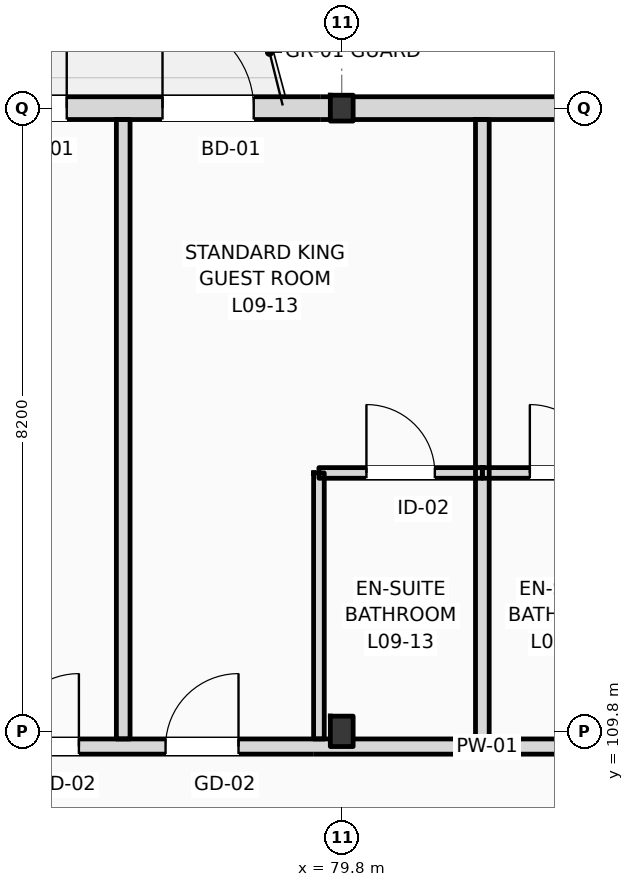
"""IFC4 building model, lengths in metres.
Left out: names, types, materials, properties, quantities, classifications, styles, units other than length and angle.
Written with IfcOpenShell. Run it as: python <this file> out.ifc"""

import sys

from ifc_helpers import new_model, si_unit, direction, frame, frame_2d, origin, origin_2d, place, context, subcontext, project, spatial, rectangle, i_section, extrude, element, fill, save


model = new_model("IFC4")
c1 = context("Model", 3, precision=1e-05, world=origin(), true_north=direction((0.0, 1.0)))
c2 = subcontext(c1, "Body", "Model", "MODEL_VIEW")
j1 = project(units=[si_unit("LENGTHUNIT", "METRE"), si_unit("PLANEANGLEUNIT", "RADIAN")], contexts=[c1])
p1 = place(None, origin())
s1 = spatial("IfcSite", under=j1, at=p1, CompositionType="ELEMENT")
p2 = place(p1, origin())
s2 = spatial("IfcBuilding", under=s1, at=p2, CompositionType="ELEMENT")
p3 = place(p2, frame((0.0, 0.0, 39.0)))
s3 = spatial("IfcBuildingStorey", under=s2, at=p3, CompositionType="ELEMENT", Elevation=39.0)
p4 = place(p3, frame((79.8, 109.8, 0.0), z_axis=(0.0, 0.0, 1.0), x_axis=(1.0, 0.0, 0.0)))
e1 = element("IfcColumn", 1, at=p4, inside=s3, PredefinedType="COLUMN", context=c2, shape_type="SweptSolid", body=[
    extrude(i_section(OverallWidth=0.3, OverallDepth=0.4, WebThickness=0.013, FlangeThickness=0.024, FilletRadius=0.027, at=origin_2d()), origin(), (0.0, 0.0, 1.0), 3.6),
])
p5 = place(p3, frame((79.8, 118.0, 0.0), z_axis=(0.0, 0.0, 1.0), x_axis=(1.0, 0.0, 0.0)))
e2 = element("IfcColumn", 2, at=p5, inside=s3, PredefinedType="COLUMN", context=c2, shape_type="SweptSolid", body=[
    extrude(i_section(OverallWidth=0.3, OverallDepth=0.34, WebThickness=0.012, FlangeThickness=0.021, FilletRadius=0.027, at=origin_2d()), origin(), (0.0, 0.0, 1.0), 3.6),
])
p6 = place(p3, frame((22.5, 118.0, 0.0), z_axis=(0.0, 0.0, 1.0), x_axis=(1.0, 0.0, 0.0)))
e3 = element("IfcWall", 3, at=p6, inside=s3, PredefinedType="STANDARD", context=c2, shape_type="SweptSolid", body=[
    extrude(rectangle(XDim=72.9, YDim=0.3, at=frame_2d((36.45, 0.0))), origin(), (0.0, 0.0, 1.0), 2.92),
])
p7 = place(p6, frame((3.6, 0.0, 0.9)))
e4 = element("IfcOpeningElement", 4, at=p7, cuts=e3, PredefinedType="OPENING", context=c2, shape_type="SweptSolid", body=[
    extrude(rectangle(XDim=1.1, YDim=1.6, at=frame_2d((0.55, 0.8))), frame((0.0, 0.16, 0.0), z_axis=(0.0, -1.0, 0.0), x_axis=(1.0, 0.0, 0.0)), (0.0, 0.0, 1.0), 0.32),
])
p8 = place(p6, frame((6.688, 0.0, 0.0)))
e5 = element("IfcOpeningElement", 5, at=p8, cuts=e3, PredefinedType="OPENING", context=c2, shape_type="SweptSolid", body=[
    extrude(rectangle(XDim=1.2, YDim=2.25, at=frame_2d((0.6, 1.125))), frame((0.0, 0.16, 0.0), z_axis=(0.0, -1.0, 0.0), x_axis=(1.0, 0.0, 0.0)), (0.0, 0.0, 1.0), 0.32),
])
p9 = place(p6, frame((11.388, 0.0, 0.9)))
e6 = element("IfcOpeningElement", 6, at=p9, cuts=e3, PredefinedType="OPENING", context=c2, shape_type="SweptSolid", body=[
    extrude(rectangle(XDim=1.6, YDim=1.75, at=frame_2d((0.8, 0.875))), frame((0.0, 0.16, 0.0), z_axis=(0.0, -1.0, 0.0), x_axis=(1.0, 0.0, 0.0)), (0.0, 0.0, 1.0), 0.32),
])
p10 = place(p6, frame((15.413, 0.0, 0.9)))
e7 = element("IfcOpeningElement", 7, at=p10, cuts=e3, PredefinedType="OPENING", context=c2, shape_type="SweptSolid", body=[
    extrude(rectangle(XDim=1.75, YDim=1.84, at=frame_2d((0.875, 0.92))), frame((0.0, 0.16, 0.0), z_axis=(0.0, -1.0, 0.0), x_axis=(1.0, 0.0, 0.0)), (0.0, 0.0, 1.0), 0.32),
])
p11 = place(p6, frame((21.245, 0.0, 0.0)))
e8 = element("IfcOpeningElement", 8, at=p11, cuts=e3, PredefinedType="OPENING", context=c2, shape_type="SweptSolid", body=[
    extrude(rectangle(XDim=1.2, YDim=2.25, at=frame_2d((0.6, 1.125))), frame((0.0, 0.16, 0.0), z_axis=(0.0, -1.0, 0.0), x_axis=(1.0, 0.0, 0.0)), (0.0, 0.0, 1.0), 0.32),
])
p12 = place(p6, frame((23.705, 0.0, 0.0)))
e9 = element("IfcOpeningElement", 9, at=p12, cuts=e3, PredefinedType="OPENING", context=c2, shape_type="SweptSolid", body=[
    extrude(rectangle(XDim=1.2, YDim=2.25, at=frame_2d((0.6, 1.125))), frame((0.0, 0.16, 0.0), z_axis=(0.0, -1.0, 0.0), x_axis=(1.0, 0.0, 0.0)), (0.0, 0.0, 1.0), 0.32),
])
p13 = place(p6, frame((28.488, 0.0, 0.9)))
e10 = element("IfcOpeningElement", 10, at=p13, cuts=e3, PredefinedType="OPENING", context=c2, shape_type="SweptSolid", body=[
    extrude(rectangle(XDim=2.6, YDim=1.84, at=frame_2d((1.3, 0.92))), frame((0.0, 0.16, 0.0), z_axis=(0.0, -1.0, 0.0), x_axis=(1.0, 0.0, 0.0)), (0.0, 0.0, 1.0), 0.32),
])
p14 = place(p6, frame((34.76, 0.0, 0.9)))
e11 = element("IfcOpeningElement", 11, at=p14, cuts=e3, PredefinedType="OPENING", context=c2, shape_type="SweptSolid", body=[
    extrude(rectangle(XDim=1.1, YDim=1.84, at=frame_2d((0.55, 0.92))), frame((0.0, 0.16, 0.0), z_axis=(0.0, -1.0, 0.0), x_axis=(1.0, 0.0, 0.0)), (0.0, 0.0, 1.0), 0.32),
])
p15 = place(p6, frame((38.143, 0.0, 0.0)))
e12 = element("IfcOpeningElement", 12, at=p15, cuts=e3, PredefinedType="OPENING", context=c2, shape_type="SweptSolid", body=[
    extrude(rectangle(XDim=1.2, YDim=2.25, at=frame_2d((0.6, 1.125))), frame((0.0, 0.16, 0.0), z_axis=(0.0, -1.0, 0.0), x_axis=(1.0, 0.0, 0.0)), (0.0, 0.0, 1.0), 0.32),
])
p16 = place(p6, frame((42.687, 0.0, 0.9)))
e13 = element("IfcOpeningElement", 13, at=p16, cuts=e3, PredefinedType="OPENING", context=c2, shape_type="SweptSolid", body=[
    extrude(rectangle(XDim=1.2, YDim=1.8, at=frame_2d((0.6, 0.9))), frame((0.0, 0.16, 0.0), z_axis=(0.0, -1.0, 0.0), x_axis=(1.0, 0.0, 0.0)), (0.0, 0.0, 1.0), 0.32),
])
p17 = place(p6, frame((47.112, 0.0, 0.9)))
e14 = element("IfcOpeningElement", 14, at=p17, cuts=e3, PredefinedType="OPENING", context=c2, shape_type="SweptSolid", body=[
    extrude(rectangle(XDim=1.35, YDim=1.84, at=frame_2d((0.675, 0.92))), frame((0.0, 0.16, 0.0), z_axis=(0.0, -1.0, 0.0), x_axis=(1.0, 0.0, 0.0)), (0.0, 0.0, 1.0), 0.32),
])
p18 = place(p6, frame((52.482, 0.0, 0.0)))
e15 = element("IfcOpeningElement", 15, at=p18, cuts=e3, PredefinedType="OPENING", context=c2, shape_type="SweptSolid", body=[
    extrude(rectangle(XDim=1.2, YDim=2.25, at=frame_2d((0.6, 1.125))), frame((0.0, 0.16, 0.0), z_axis=(0.0, -1.0, 0.0), x_axis=(1.0, 0.0, 0.0)), (0.0, 0.0, 1.0), 0.32),
])
p19 = place(p6, frame((54.942, 0.0, 0.0)))
e16 = element("IfcOpeningElement", 16, at=p19, cuts=e3, PredefinedType="OPENING", context=c2, shape_type="SweptSolid", body=[
    extrude(rectangle(XDim=1.2, YDim=2.25, at=frame_2d((0.6, 1.125))), frame((0.0, 0.16, 0.0), z_axis=(0.0, -1.0, 0.0), x_axis=(1.0, 0.0, 0.0)), (0.0, 0.0, 1.0), 0.32),
])
p20 = place(p6, frame((60.387, 0.0, 0.9)))
e17 = element("IfcOpeningElement", 17, at=p20, cuts=e3, PredefinedType="OPENING", context=c2, shape_type="SweptSolid", body=[
    extrude(rectangle(XDim=1.8, YDim=1.84, at=frame_2d((0.9, 0.92))), frame((0.0, 0.16, 0.0), z_axis=(0.0, -1.0, 0.0), x_axis=(1.0, 0.0, 0.0)), (0.0, 0.0, 1.0), 0.32),
])
p21 = place(p6, frame((66.013, 0.0, 0.9)))
e18 = element("IfcOpeningElement", 18, at=p21, cuts=e3, PredefinedType="OPENING", context=c2, shape_type="SweptSolid", body=[
    extrude(rectangle(XDim=1.35, YDim=1.84, at=frame_2d((0.675, 0.92))), frame((0.0, 0.16, 0.0), z_axis=(0.0, -1.0, 0.0), x_axis=(1.0, 0.0, 0.0)), (0.0, 0.0, 1.0), 0.32),
])
p22 = place(p6, frame((69.275, 0.0, 0.9)))
e19 = element("IfcOpeningElement", 19, at=p22, cuts=e3, PredefinedType="OPENING", context=c2, shape_type="SweptSolid", body=[
    extrude(rectangle(XDim=2.1, YDim=1.84, at=frame_2d((1.05, 0.92))), frame((0.0, 0.16, 0.0), z_axis=(0.0, -1.0, 0.0), x_axis=(1.0, 0.0, 0.0)), (0.0, 0.0, 1.0), 0.32),
])
p23 = place(p3, frame((10.65, 109.6, 0.0), z_axis=(0.0, 0.0, 1.0), x_axis=(1.0, 0.0, 0.0)))
e20 = element("IfcWall", 20, at=p23, inside=s3, PredefinedType="PARTITIONING", context=c2, shape_type="SweptSolid", body=[
    extrude(rectangle(XDim=84.61, YDim=0.2, at=frame_2d((42.305, 0.0))), origin(), (0.0, 0.0, 1.0), 2.82),
])
p24 = place(p23, frame((15.49, 0.0, 0.0)))
e21 = element("IfcOpeningElement", 21, at=p24, cuts=e20, PredefinedType="OPENING", context=c2, shape_type="SweptSolid", body=[
    extrude(rectangle(XDim=1.02, YDim=2.2, at=frame_2d((0.51, 1.1))), frame((0.0, 0.11, 0.0), z_axis=(0.0, -1.0, 0.0), x_axis=(1.0, 0.0, 0.0)), (0.0, 0.0, 1.0), 0.22),
])
p25 = place(p23, frame((19.703, 0.0, 0.0)))
e22 = element("IfcOpeningElement", 22, at=p25, cuts=e20, PredefinedType="OPENING", context=c2, shape_type="SweptSolid", body=[
    extrude(rectangle(XDim=1.02, YDim=2.2, at=frame_2d((0.51, 1.1))), frame((0.0, 0.11, 0.0), z_axis=(0.0, -1.0, 0.0), x_axis=(1.0, 0.0, 0.0)), (0.0, 0.0, 1.0), 0.22),
])
p26 = place(p23, frame((24.203, 0.0, 0.0)))
e23 = element("IfcOpeningElement", 23, at=p26, cuts=e20, PredefinedType="OPENING", context=c2, shape_type="SweptSolid", body=[
    extrude(rectangle(XDim=1.02, YDim=2.2, at=frame_2d((0.51, 1.1))), frame((0.0, 0.11, 0.0), z_axis=(0.0, -1.0, 0.0), x_axis=(1.0, 0.0, 0.0)), (0.0, 0.0, 1.0), 0.22),
])
p27 = place(p23, frame((26.552, 0.0, 0.0)))
e24 = element("IfcOpeningElement", 24, at=p27, cuts=e20, PredefinedType="OPENING", context=c2, shape_type="SweptSolid", body=[
    extrude(rectangle(XDim=1.02, YDim=2.2, at=frame_2d((0.51, 1.1))), frame((0.0, 0.11, 0.0), z_axis=(0.0, -1.0, 0.0), x_axis=(1.0, 0.0, 0.0)), (0.0, 0.0, 1.0), 0.22),
])
p28 = place(p23, frame((33.233, 0.0, 0.0)))
e25 = element("IfcOpeningElement", 25, at=p28, cuts=e20, PredefinedType="OPENING", context=c2, shape_type="SweptSolid", body=[
    extrude(rectangle(XDim=0.96, YDim=2.2, at=frame_2d((0.48, 1.1))), frame((0.0, 0.11, 0.0), z_axis=(0.0, -1.0, 0.0), x_axis=(1.0, 0.0, 0.0)), (0.0, 0.0, 1.0), 0.22),
])
p29 = place(p23, frame((35.583, 0.0, 0.0)))
e26 = element("IfcOpeningElement", 26, at=p29, cuts=e20, PredefinedType="OPENING", context=c2, shape_type="SweptSolid", body=[
    extrude(rectangle(XDim=0.96, YDim=2.2, at=frame_2d((0.48, 1.1))), frame((0.0, 0.11, 0.0), z_axis=(0.0, -1.0, 0.0), x_axis=(1.0, 0.0, 0.0)), (0.0, 0.0, 1.0), 0.22),
])
p30 = place(p23, frame((42.233, 0.0, 0.0)))
e27 = element("IfcOpeningElement", 27, at=p30, cuts=e20, PredefinedType="OPENING", context=c2, shape_type="SweptSolid", body=[
    extrude(rectangle(XDim=0.96, YDim=2.2, at=frame_2d((0.48, 1.1))), frame((0.0, 0.11, 0.0), z_axis=(0.0, -1.0, 0.0), x_axis=(1.0, 0.0, 0.0)), (0.0, 0.0, 1.0), 0.22),
])
p31 = place(p23, frame((46.983, 0.0, 0.0)))
e28 = element("IfcOpeningElement", 28, at=p31, cuts=e20, PredefinedType="OPENING", context=c2, shape_type="SweptSolid", body=[
    extrude(rectangle(XDim=0.96, YDim=2.2, at=frame_2d((0.48, 1.1))), frame((0.0, 0.11, 0.0), z_axis=(0.0, -1.0, 0.0), x_axis=(1.0, 0.0, 0.0)), (0.0, 0.0, 1.0), 0.22),
])
p32 = place(p23, frame((51.233, 0.0, 0.0)))
e29 = element("IfcOpeningElement", 29, at=p32, cuts=e20, PredefinedType="OPENING", context=c2, shape_type="SweptSolid", body=[
    extrude(rectangle(XDim=0.96, YDim=2.2, at=frame_2d((0.48, 1.1))), frame((0.0, 0.11, 0.0), z_axis=(0.0, -1.0, 0.0), x_axis=(1.0, 0.0, 0.0)), (0.0, 0.0, 1.0), 0.22),
])
p33 = place(p23, frame((55.733, 0.0, 0.0)))
e30 = element("IfcOpeningElement", 30, at=p33, cuts=e20, PredefinedType="OPENING", context=c2, shape_type="SweptSolid", body=[
    extrude(rectangle(XDim=0.96, YDim=2.2, at=frame_2d((0.48, 1.1))), frame((0.0, 0.11, 0.0), z_axis=(0.0, -1.0, 0.0), x_axis=(1.0, 0.0, 0.0)), (0.0, 0.0, 1.0), 0.22),
])
p34 = place(p23, frame((58.083, 0.0, 0.0)))
e31 = element("IfcOpeningElement", 31, at=p34, cuts=e20, PredefinedType="OPENING", context=c2, shape_type="SweptSolid", body=[
    extrude(rectangle(XDim=0.96, YDim=2.2, at=frame_2d((0.48, 1.1))), frame((0.0, 0.11, 0.0), z_axis=(0.0, -1.0, 0.0), x_axis=(1.0, 0.0, 0.0)), (0.0, 0.0, 1.0), 0.22),
])
p35 = place(p23, frame((64.732, 0.0, 0.0)))
e32 = element("IfcOpeningElement", 32, at=p35, cuts=e20, PredefinedType="OPENING", context=c2, shape_type="SweptSolid", body=[
    extrude(rectangle(XDim=0.96, YDim=2.2, at=frame_2d((0.48, 1.1))), frame((0.0, 0.11, 0.0), z_axis=(0.0, -1.0, 0.0), x_axis=(1.0, 0.0, 0.0)), (0.0, 0.0, 1.0), 0.22),
])
p36 = place(p23, frame((66.832, 0.0, 0.0)))
e33 = element("IfcOpeningElement", 33, at=p36, cuts=e20, PredefinedType="OPENING", context=c2, shape_type="SweptSolid", body=[
    extrude(rectangle(XDim=0.96, YDim=2.2, at=frame_2d((0.48, 1.1))), frame((0.0, 0.11, 0.0), z_axis=(0.0, -1.0, 0.0), x_axis=(1.0, 0.0, 0.0)), (0.0, 0.0, 1.0), 0.22),
])
p37 = place(p23, frame((73.732, 0.0, 0.0)))
e34 = element("IfcOpeningElement", 34, at=p37, cuts=e20, PredefinedType="OPENING", context=c2, shape_type="SweptSolid", body=[
    extrude(rectangle(XDim=0.96, YDim=2.2, at=frame_2d((0.48, 1.1))), frame((0.0, 0.11, 0.0), z_axis=(0.0, -1.0, 0.0), x_axis=(1.0, 0.0, 0.0)), (0.0, 0.0, 1.0), 0.22),
])
p38 = place(p23, frame((78.233, 0.0, 0.0)))
e35 = element("IfcOpeningElement", 35, at=p38, cuts=e20, PredefinedType="OPENING", context=c2, shape_type="SweptSolid", body=[
    extrude(rectangle(XDim=0.96, YDim=2.2, at=frame_2d((0.48, 1.1))), frame((0.0, 0.11, 0.0), z_axis=(0.0, -1.0, 0.0), x_axis=(1.0, 0.0, 0.0)), (0.0, 0.0, 1.0), 0.22),
])
p39 = place(p23, frame((80.62, 0.0, 0.0)))
e36 = element("IfcOpeningElement", 36, at=p39, cuts=e20, PredefinedType="OPENING", context=c2, shape_type="SweptSolid", body=[
    extrude(rectangle(XDim=0.96, YDim=2.2, at=frame_2d((0.48, 1.1))), frame((0.0, 0.11, 0.0), z_axis=(0.0, -1.0, 0.0), x_axis=(1.0, 0.0, 0.0)), (0.0, 0.0, 1.0), 0.22),
])
p40 = place(p23, frame((2.716, 0.0, 0.0)))
e37 = element("IfcOpeningElement", 37, at=p40, cuts=e20, PredefinedType="OPENING", context=c2, shape_type="SweptSolid", body=[
    extrude(rectangle(XDim=1.35, YDim=2.25, at=frame_2d((0.675, 1.125))), frame((0.0, 0.11, 0.0), z_axis=(0.0, -1.0, 0.0), x_axis=(1.0, 0.0, 0.0)), (0.0, 0.0, 1.0), 0.22),
])
p41 = place(p23, frame((6.65, 0.0, 0.0)))
e38 = element("IfcOpeningElement", 38, at=p41, cuts=e20, PredefinedType="OPENING", context=c2, shape_type="SweptSolid", body=[
    extrude(rectangle(XDim=1.35, YDim=2.25, at=frame_2d((0.675, 1.125))), frame((0.0, 0.11, 0.0), z_axis=(0.0, -1.0, 0.0), x_axis=(1.0, 0.0, 0.0)), (0.0, 0.0, 1.0), 0.22),
])
p42 = place(p23, frame((10.583, 0.0, 0.0)))
e39 = element("IfcOpeningElement", 39, at=p42, cuts=e20, PredefinedType="OPENING", context=c2, shape_type="SweptSolid", body=[
    extrude(rectangle(XDim=1.35, YDim=2.25, at=frame_2d((0.675, 1.125))), frame((0.0, 0.11, 0.0), z_axis=(0.0, -1.0, 0.0), x_axis=(1.0, 0.0, 0.0)), (0.0, 0.0, 1.0), 0.22),
])
for number, where, z_axis, x_axis in (
    (40, (76.925, 109.7, 0.0), (0.0, 0.0, 1.0), (0.0, 1.0, 0.0)),
    (41, (81.65, 109.7, 0.0), (0.0, 0.0, 1.0), (0.0, 1.0, 0.0)),
):
    element("IfcWall", number, at=place(p3, frame(where, z_axis=z_axis, x_axis=x_axis)), inside=s3, PredefinedType="PARTITIONING", context=c2, shape_type="SweptSolid", body=[
        extrude(rectangle(XDim=8.15, YDim=0.18, at=frame_2d((4.075, 0.0))), origin(), (0.0, 0.0, 1.0), 3.38),
    ])
p43 = place(p3, frame((79.5, 109.7, 0.0), z_axis=(0.0, 0.0, 1.0), x_axis=(0.0, 1.0, 0.0)))
e42 = element("IfcWall", 42, at=p43, inside=s3, PredefinedType="PARTITIONING", context=c2, shape_type="SweptSolid", body=[
    extrude(rectangle(XDim=3.5, YDim=0.14, at=frame_2d((1.75, 0.0))), origin(), (0.0, 0.0, 1.0), 3.38),
])
p44 = place(p3, frame((79.5, 113.2, 0.0), z_axis=(0.0, 0.0, 1.0), x_axis=(1.0, 0.0, 0.0)))
e43 = element("IfcWall", 43, at=p44, inside=s3, PredefinedType="PARTITIONING", context=c2, shape_type="SweptSolid", body=[
    extrude(rectangle(XDim=2.15, YDim=0.14, at=frame_2d((1.075, 0.0))), origin(), (0.0, 0.0, 1.0), 3.38),
])
p45 = place(p44, frame((0.625, 0.0, 0.0)))
e44 = element("IfcOpeningElement", 44, at=p45, cuts=e43, PredefinedType="OPENING", context=c2, shape_type="SweptSolid", body=[
    extrude(rectangle(XDim=0.9, YDim=2.1, at=frame_2d((0.45, 1.05))), frame((0.0, 0.08, 0.0), z_axis=(0.0, -1.0, 0.0), x_axis=(1.0, 0.0, 0.0)), (0.0, 0.0, 1.0), 0.16),
])
p46 = place(p3, frame((81.65, 113.2, 0.0), z_axis=(0.0, 0.0, 1.0), x_axis=(1.0, 0.0, 0.0)))
e45 = element("IfcWall", 45, at=p46, inside=s3, PredefinedType="PARTITIONING", context=c2, shape_type="SweptSolid", body=[
    extrude(rectangle(XDim=2.15, YDim=0.14, at=frame_2d((1.075, 0.0))), origin(), (0.0, 0.0, 1.0), 3.38),
])
p47 = place(p46, frame((0.625, 0.0, 0.0)))
e46 = element("IfcOpeningElement", 46, at=p47, cuts=e45, PredefinedType="OPENING", context=c2, shape_type="SweptSolid", body=[
    extrude(rectangle(XDim=0.9, YDim=2.1, at=frame_2d((0.45, 1.05))), frame((0.0, 0.08, 0.0), z_axis=(0.0, -1.0, 0.0), x_axis=(1.0, 0.0, 0.0)), (0.0, 0.0, 1.0), 0.16),
])
p48 = place(p18, origin())
e47 = element("IfcDoor", 47, at=p48, inside=s3, OperationType="SINGLE_SWING_RIGHT", PredefinedType="DOOR", context=c2, shape_type="SweptSolid", body=[
    extrude(rectangle(XDim=1.2, YDim=2.25, at=frame_2d((0.6, 1.125))), frame((0.0, 0.025, 0.0), z_axis=(0.0, -1.0, 0.0), x_axis=(1.0, 0.0, 0.0)), (0.0, 0.0, 1.0), 0.05),
])
fill(e15, e47)
p49 = place(p19, origin())
e48 = element("IfcDoor", 48, at=p49, inside=s3, OperationType="SINGLE_SWING_LEFT", PredefinedType="DOOR", context=c2, shape_type="SweptSolid", body=[
    extrude(rectangle(XDim=1.2, YDim=2.25, at=frame_2d((0.6, 1.125))), frame((0.0, 0.025, 0.0), z_axis=(0.0, -1.0, 0.0), x_axis=(1.0, 0.0, 0.0)), (0.0, 0.0, 1.0), 0.05),
])
fill(e16, e48)
p50 = place(p35, origin())
e49 = element("IfcDoor", 49, at=p50, inside=s3, OperationType="SINGLE_SWING_RIGHT", PredefinedType="DOOR", context=c2, shape_type="SweptSolid", body=[
    extrude(rectangle(XDim=0.96, YDim=2.2, at=frame_2d((0.48, 1.1))), frame((0.0, 0.025, 0.0), z_axis=(0.0, -1.0, 0.0), x_axis=(1.0, 0.0, 0.0)), (0.0, 0.0, 1.0), 0.05),
])
fill(e32, e49)
p51 = place(p36, origin())
e50 = element("IfcDoor", 50, at=p51, inside=s3, OperationType="SINGLE_SWING_RIGHT", PredefinedType="DOOR", context=c2, shape_type="SweptSolid", body=[
    extrude(rectangle(XDim=0.96, YDim=2.2, at=frame_2d((0.48, 1.1))), frame((0.0, 0.025, 0.0), z_axis=(0.0, -1.0, 0.0), x_axis=(1.0, 0.0, 0.0)), (0.0, 0.0, 1.0), 0.05),
])
fill(e33, e50)
p52 = place(p45, origin())
e51 = element("IfcDoor", 51, at=p52, inside=s3, OperationType="SINGLE_SWING_LEFT", PredefinedType="DOOR", context=c2, shape_type="SweptSolid", body=[
    extrude(rectangle(XDim=0.9, YDim=2.1, at=frame_2d((0.45, 1.05))), frame((0.0, 0.025, 0.0), z_axis=(0.0, -1.0, 0.0), x_axis=(1.0, 0.0, 0.0)), (0.0, 0.0, 1.0), 0.05),
])
fill(e44, e51)
p53 = place(p47, origin())
e52 = element("IfcDoor", 52, at=p53, inside=s3, OperationType="SINGLE_SWING_LEFT", PredefinedType="DOOR", context=c2, shape_type="SweptSolid", body=[
    extrude(rectangle(XDim=0.9, YDim=2.1, at=frame_2d((0.45, 1.05))), frame((0.0, 0.025, 0.0), z_axis=(0.0, -1.0, 0.0), x_axis=(1.0, 0.0, 0.0)), (0.0, 0.0, 1.0), 0.05),
])
fill(e46, e52)
save(model, sys.argv[1])
